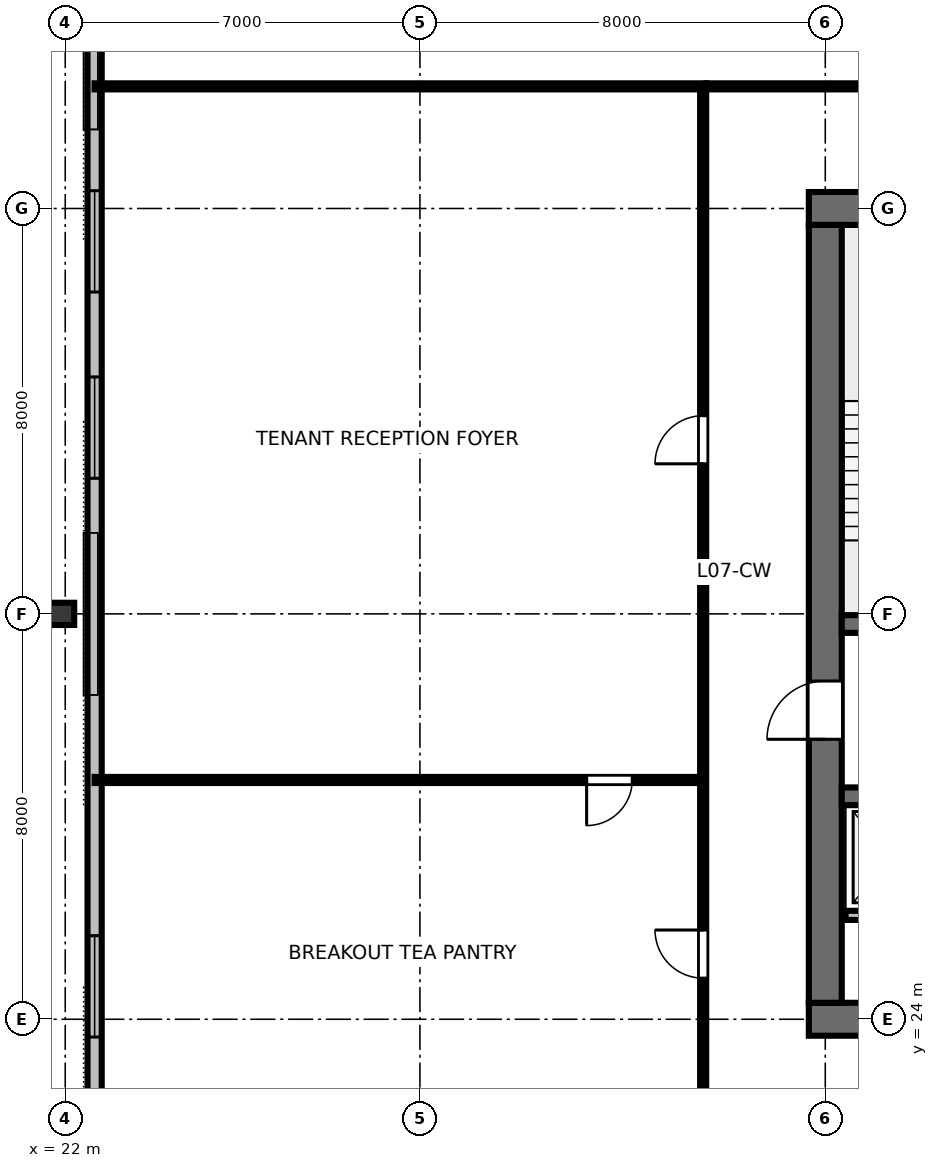
"""IFC4 building model, lengths in metres.
Left out: names, types, materials, properties, quantities, classifications, styles, units other than length and angle.
Written with IfcOpenShell. Run it as: python <this file> out.ifc"""

import sys

from ifc_helpers import new_model, si_unit, direction, frame, frame_2d, origin, origin_2d, place, context, subcontext, project, spatial, rectangle, i_section, extrude, element, fill, save


model = new_model("IFC4")
c1 = context("Model", 3, precision=1e-05, world=origin(), true_north=direction((0.0, 1.0)))
c2 = subcontext(c1, "Body", "Model", "MODEL_VIEW")
j1 = project(units=[si_unit("LENGTHUNIT", "METRE"), si_unit("PLANEANGLEUNIT", "RADIAN")], contexts=[c1])
p1 = place(None, origin())
s1 = spatial("IfcSite", under=j1, at=p1, CompositionType="ELEMENT")
p2 = place(p1, origin())
s2 = spatial("IfcBuilding", under=s1, at=p2, CompositionType="ELEMENT")
p3 = place(p2, frame((0.0, 0.0, 31.6)))
s3 = spatial("IfcBuildingStorey", under=s2, at=p3, CompositionType="ELEMENT", Elevation=31.6)
p4 = place(p3, frame((36.675, 24.0, 0.0), z_axis=(0.0, 0.0, 1.0), x_axis=(1.0, 0.0, 0.0)))
e1 = element("IfcWall", 1, at=p4, inside=s3, PredefinedType="SHEAR", context=c2, shape_type="SweptSolid", body=[
    extrude(rectangle(XDim=18.65, YDim=0.65, at=frame_2d((9.325, 0.0))), origin(), (0.0, 0.0, 1.0), 3.36),
])
p5 = place(p4, frame((5.725, 0.0, 0.0)))
e2 = element("IfcOpeningElement", 2, at=p5, cuts=e1, PredefinedType="OPENING", context=c2, shape_type="SweptSolid", body=[
    extrude(rectangle(XDim=1.6, YDim=2.15, at=frame_2d((0.8, 1.075))), frame((0.0, 0.335, 0.0), z_axis=(0.0, -1.0, 0.0), x_axis=(1.0, 0.0, 0.0)), (0.0, 0.0, 1.0), 0.67),
])
p6 = place(p4, frame((12.125, 0.0, 0.0)))
e3 = element("IfcOpeningElement", 3, at=p6, cuts=e1, PredefinedType="OPENING", context=c2, shape_type="SweptSolid", body=[
    extrude(rectangle(XDim=1.6, YDim=2.15, at=frame_2d((0.8, 1.075))), frame((0.0, 0.335, 0.0), z_axis=(0.0, -1.0, 0.0), x_axis=(1.0, 0.0, 0.0)), (0.0, 0.0, 1.0), 0.67),
])
p7 = place(p3, frame((36.675, 40.0, 0.0), z_axis=(0.0, 0.0, 1.0), x_axis=(1.0, 0.0, 0.0)))
e4 = element("IfcWall", 4, at=p7, inside=s3, PredefinedType="SHEAR", context=c2, shape_type="SweptSolid", body=[
    extrude(rectangle(XDim=18.65, YDim=0.65, at=frame_2d((9.325, 0.0))), origin(), (0.0, 0.0, 1.0), 3.36),
])
p8 = place(p7, frame((8.825, 0.0, 0.0)))
e5 = element("IfcOpeningElement", 5, at=p8, cuts=e4, PredefinedType="OPENING", context=c2, shape_type="SweptSolid", body=[
    extrude(rectangle(XDim=1.0, YDim=2.15, at=frame_2d((0.5, 1.075))), frame((0.0, 0.335, 0.0), z_axis=(0.0, -1.0, 0.0), x_axis=(1.0, 0.0, 0.0)), (0.0, 0.0, 1.0), 0.67),
])
p9 = place(p3, frame((37.0, 24.325, 0.0), z_axis=(0.0, 0.0, 1.0), x_axis=(0.0, 1.0, 0.0)))
e6 = element("IfcWall", 6, at=p9, inside=s3, PredefinedType="SHEAR", context=c2, shape_type="SweptSolid", body=[
    extrude(rectangle(XDim=15.35, YDim=0.65, at=frame_2d((7.675, 0.0))), origin(), (0.0, 0.0, 1.0), 3.36),
])
p10 = place(p9, frame((5.2, 0.0, 0.0)))
e7 = element("IfcOpeningElement", 7, at=p10, cuts=e6, PredefinedType="OPENING", context=c2, shape_type="SweptSolid", body=[
    extrude(rectangle(XDim=1.15, YDim=2.15, at=frame_2d((0.575, 1.075))), frame((0.0, 0.335, 0.0), z_axis=(0.0, -1.0, 0.0), x_axis=(1.0, 0.0, 0.0)), (0.0, 0.0, 1.0), 0.67),
])
p11 = place(p3, frame((37.325, 31.8, 0.0), z_axis=(0.0, 0.0, 1.0), x_axis=(1.0, 0.0, 0.0)))
e8 = element("IfcWall", 8, at=p11, inside=s3, PredefinedType="SHEAR", context=c2, shape_type="SweptSolid", body=[
    extrude(rectangle(XDim=17.35, YDim=0.35, at=frame_2d((8.675, 0.0))), origin(), (0.0, 0.0, 1.0), 3.36),
])
p12 = place(p11, frame((0.725, 0.0, 0.0)))
e9 = element("IfcOpeningElement", 9, at=p12, cuts=e8, PredefinedType="OPENING", context=c2, shape_type="SweptSolid", body=[
    extrude(rectangle(XDim=1.1, YDim=2.15, at=frame_2d((0.55, 1.075))), frame((0.0, 0.185, 0.0), z_axis=(0.0, -1.0, 0.0), x_axis=(1.0, 0.0, 0.0)), (0.0, 0.0, 1.0), 0.37),
])
p13 = place(p11, frame((14.625, 0.0, 0.0)))
e10 = element("IfcOpeningElement", 10, at=p13, cuts=e8, PredefinedType="OPENING", context=c2, shape_type="SweptSolid", body=[
    extrude(rectangle(XDim=1.1, YDim=2.15, at=frame_2d((0.55, 1.075))), frame((0.0, 0.185, 0.0), z_axis=(0.0, -1.0, 0.0), x_axis=(1.0, 0.0, 0.0)), (0.0, 0.0, 1.0), 0.37),
])
p14 = place(p3, frame((37.325, 28.4, 0.0), z_axis=(0.0, 0.0, 1.0), x_axis=(1.0, 0.0, 0.0)))
e11 = element("IfcWall", 11, at=p14, inside=s3, PredefinedType="SHEAR", context=c2, shape_type="SweptSolid", body=[
    extrude(rectangle(XDim=17.35, YDim=0.35, at=frame_2d((8.675, 0.0))), origin(), (0.0, 0.0, 1.0), 3.36),
])
p15 = place(p3, frame((21.92, 32.0, 0.0), z_axis=(0.0, 0.0, 1.0), x_axis=(0.0, 1.0, 0.0)))
e12 = element("IfcColumn", 12, at=p15, inside=s3, PredefinedType="COLUMN", context=c2, shape_type="SweptSolid", body=[
    extrude(i_section(OverallWidth=0.439, OverallDepth=0.514, WebThickness=0.06, FlangeThickness=0.097, FilletRadius=0.025, at=origin_2d()), origin(), (0.0, 0.0, 1.0), 3.148),
])
p16 = place(p3, frame((22.58, 49.64, 0.0), z_axis=(0.0, 0.0, 1.0), x_axis=(0.0, -1.0, 0.0)))
e13 = element("IfcWall", 13, at=p16, inside=s3, PredefinedType="STANDARD", context=c2, shape_type="SweptSolid", body=[
    extrude(rectangle(XDim=35.28, YDim=0.28, at=frame_2d((17.64, 0.0))), origin(), (0.0, 0.0, 1.0), 3.15),
])
p17 = place(p16, frame((1.938, 0.0, 0.8)))
e14 = element("IfcOpeningElement", 14, at=p17, cuts=e13, PredefinedType="OPENING", context=c2, shape_type="SweptSolid", body=[
    extrude(rectangle(XDim=2.0, YDim=1.95, at=frame_2d((1.0, 0.975))), frame((0.0, 0.15, 0.0), z_axis=(0.0, -1.0, 0.0), x_axis=(1.0, 0.0, 0.0)), (0.0, 0.0, 1.0), 0.3),
])
p18 = place(p16, frame((9.289, 0.0, 0.8)))
e15 = element("IfcOpeningElement", 15, at=p18, cuts=e13, PredefinedType="OPENING", context=c2, shape_type="SweptSolid", body=[
    extrude(rectangle(XDim=2.0, YDim=1.95, at=frame_2d((1.0, 0.975))), frame((0.0, 0.15, 0.0), z_axis=(0.0, -1.0, 0.0), x_axis=(1.0, 0.0, 0.0)), (0.0, 0.0, 1.0), 0.3),
])
p19 = place(p16, frame((12.964, 0.0, 0.8)))
e16 = element("IfcOpeningElement", 16, at=p19, cuts=e13, PredefinedType="OPENING", context=c2, shape_type="SweptSolid", body=[
    extrude(rectangle(XDim=2.0, YDim=1.95, at=frame_2d((1.0, 0.975))), frame((0.0, 0.15, 0.0), z_axis=(0.0, -1.0, 0.0), x_axis=(1.0, 0.0, 0.0)), (0.0, 0.0, 1.0), 0.3),
])
p20 = place(p16, frame((23.991, 0.0, 0.8)))
e17 = element("IfcOpeningElement", 17, at=p20, cuts=e13, PredefinedType="OPENING", context=c2, shape_type="SweptSolid", body=[
    extrude(rectangle(XDim=2.0, YDim=1.95, at=frame_2d((1.0, 0.975))), frame((0.0, 0.15, 0.0), z_axis=(0.0, -1.0, 0.0), x_axis=(1.0, 0.0, 0.0)), (0.0, 0.0, 1.0), 0.3),
])
p21 = place(p16, frame((31.342, 0.0, 0.8)))
e18 = element("IfcOpeningElement", 18, at=p21, cuts=e13, PredefinedType="OPENING", context=c2, shape_type="SweptSolid", body=[
    extrude(rectangle(XDim=2.0, YDim=1.95, at=frame_2d((1.0, 0.975))), frame((0.0, 0.15, 0.0), z_axis=(0.0, -1.0, 0.0), x_axis=(1.0, 0.0, 0.0)), (0.0, 0.0, 1.0), 0.3),
])
p22 = place(p3, frame((37.4, 26.05, 0.0), z_axis=(0.0, 0.0, 1.0), x_axis=(1.0, 0.0, 0.0)))
e19 = element("IfcWall", 19, at=p22, inside=s3, PredefinedType="PARTITIONING", context=c2, shape_type="SweptSolid", body=[
    extrude(rectangle(XDim=17.2, YDim=0.18, at=frame_2d((8.6, 0.0))), origin(), (0.0, 0.0, 1.0), 3.15),
])
p23 = place(p22, frame((1.1, 0.0, 0.0)))
e20 = element("IfcOpeningElement", 20, at=p23, cuts=e19, PredefinedType="OPENING", context=c2, shape_type="SweptSolid", body=[
    extrude(rectangle(XDim=1.05, YDim=2.15, at=frame_2d((0.525, 1.075))), frame((0.0, 0.1, 0.0), z_axis=(0.0, -1.0, 0.0), x_axis=(1.0, 0.0, 0.0)), (0.0, 0.0, 1.0), 0.2),
])
p24 = place(p22, frame((3.0, 0.0, 0.0)))
e21 = element("IfcOpeningElement", 21, at=p24, cuts=e19, PredefinedType="OPENING", context=c2, shape_type="SweptSolid", body=[
    extrude(rectangle(XDim=1.05, YDim=2.15, at=frame_2d((0.525, 1.075))), frame((0.0, 0.1, 0.0), z_axis=(0.0, -1.0, 0.0), x_axis=(1.0, 0.0, 0.0)), (0.0, 0.0, 1.0), 0.2),
])
p25 = place(p3, frame((34.65, 42.41, 0.0), z_axis=(0.0, 0.0, 1.0), x_axis=(1.0, 0.0, 0.0)))
e22 = element("IfcWall", 22, at=p25, inside=s3, PredefinedType="PARTITIONING", context=c2, shape_type="SweptSolid", body=[
    extrude(rectangle(XDim=22.7, YDim=0.12, at=frame_2d((11.35, 0.0))), origin(), (0.0, 0.0, 1.0), 2.43),
])
p26 = place(p25, frame((3.981, 0.0, 0.0)))
e23 = element("IfcOpeningElement", 23, at=p26, cuts=e22, PredefinedType="OPENING", context=c2, shape_type="SweptSolid", body=[
    extrude(rectangle(XDim=0.95, YDim=2.15, at=frame_2d((0.475, 1.075))), frame((0.0, 0.07, 0.0), z_axis=(0.0, -1.0, 0.0), x_axis=(1.0, 0.0, 0.0)), (0.0, 0.0, 1.0), 0.14),
])
p27 = place(p25, frame((10.508, 0.0, 0.0)))
e24 = element("IfcOpeningElement", 24, at=p27, cuts=e22, PredefinedType="OPENING", context=c2, shape_type="SweptSolid", body=[
    extrude(rectangle(XDim=0.95, YDim=2.15, at=frame_2d((0.475, 1.075))), frame((0.0, 0.07, 0.0), z_axis=(0.0, -1.0, 0.0), x_axis=(1.0, 0.0, 0.0)), (0.0, 0.0, 1.0), 0.14),
])
p28 = place(p25, frame((17.402, 0.0, 0.0)))
e25 = element("IfcOpeningElement", 25, at=p28, cuts=e22, PredefinedType="OPENING", context=c2, shape_type="SweptSolid", body=[
    extrude(rectangle(XDim=0.95, YDim=2.15, at=frame_2d((0.475, 1.075))), frame((0.0, 0.07, 0.0), z_axis=(0.0, -1.0, 0.0), x_axis=(1.0, 0.0, 0.0)), (0.0, 0.0, 1.0), 0.14),
])
p29 = place(p3, frame((34.59, 28.722, 0.0), z_axis=(0.0, 0.0, 1.0), x_axis=(-1.0, 0.0, 0.0)))
e26 = element("IfcWall", 26, at=p29, inside=s3, PredefinedType="PARTITIONING", context=c2, shape_type="SweptSolid", body=[
    extrude(rectangle(XDim=12.01, YDim=0.12, at=frame_2d((6.005, 0.0))), origin(), (0.0, 0.0, 1.0), 2.43),
])
p30 = place(p29, frame((1.4, 0.0, 0.0)))
e27 = element("IfcOpeningElement", 27, at=p30, cuts=e26, PredefinedType="OPENING", context=c2, shape_type="SweptSolid", body=[
    extrude(rectangle(XDim=0.9, YDim=2.15, at=frame_2d((0.45, 1.075))), frame((0.0, 0.07, 0.0), z_axis=(0.0, -1.0, 0.0), x_axis=(1.0, 0.0, 0.0)), (0.0, 0.0, 1.0), 0.14),
])
p31 = place(p3, frame((34.59, 21.65, 0.0), z_axis=(0.0, 0.0, 1.0), x_axis=(0.0, 1.0, 0.0)))
e28 = element("IfcWall", 28, at=p31, inside=s3, PredefinedType="PARTITIONING", context=c2, shape_type="SweptSolid", body=[
    extrude(rectangle(XDim=20.7, YDim=0.12, at=frame_2d((10.35, 0.0))), origin(), (0.0, 0.0, 1.0), 2.43),
])
p32 = place(p31, frame((3.161, 0.0, 0.0)))
e29 = element("IfcOpeningElement", 29, at=p32, cuts=e28, PredefinedType="OPENING", context=c2, shape_type="SweptSolid", body=[
    extrude(rectangle(XDim=0.95, YDim=2.15, at=frame_2d((0.475, 1.075))), frame((0.0, 0.07, 0.0), z_axis=(0.0, -1.0, 0.0), x_axis=(1.0, 0.0, 0.0)), (0.0, 0.0, 1.0), 0.14),
])
p33 = place(p31, frame((13.311, 0.0, 0.0)))
e30 = element("IfcOpeningElement", 30, at=p33, cuts=e28, PredefinedType="OPENING", context=c2, shape_type="SweptSolid", body=[
    extrude(rectangle(XDim=0.95, YDim=2.15, at=frame_2d((0.475, 1.075))), frame((0.0, 0.07, 0.0), z_axis=(0.0, -1.0, 0.0), x_axis=(1.0, 0.0, 0.0)), (0.0, 0.0, 1.0), 0.14),
])
p34 = place(p3, frame((34.65, 42.41, 0.0), z_axis=(0.0, 0.0, 1.0), x_axis=(-1.0, 0.0, 0.0)))
e31 = element("IfcWall", 31, at=p34, inside=s3, PredefinedType="PARTITIONING", context=c2, shape_type="SweptSolid", body=[
    extrude(rectangle(XDim=12.07, YDim=0.12, at=frame_2d((6.035, 0.0))), origin(), (0.0, 0.0, 1.0), 2.43),
])
p35 = place(p18, origin())
e32 = element("IfcWindow", 32, at=p35, inside=s3, PartitioningType="SINGLE_PANEL", PredefinedType="WINDOW", context=c2, shape_type="SweptSolid", body=[
    extrude(rectangle(XDim=2.0, YDim=1.95, at=frame_2d((1.0, 0.975))), frame((0.0, 0.03, 0.0), z_axis=(0.0, -1.0, 0.0), x_axis=(1.0, 0.0, 0.0)), (0.0, 0.0, 1.0), 0.06),
])
fill(e15, e32)
p36 = place(p19, origin())
e33 = element("IfcWindow", 33, at=p36, inside=s3, PartitioningType="SINGLE_PANEL", PredefinedType="WINDOW", context=c2, shape_type="SweptSolid", body=[
    extrude(rectangle(XDim=2.0, YDim=1.95, at=frame_2d((1.0, 0.975))), frame((0.0, 0.03, 0.0), z_axis=(0.0, -1.0, 0.0), x_axis=(1.0, 0.0, 0.0)), (0.0, 0.0, 1.0), 0.06),
])
fill(e16, e33)
p37 = place(p20, origin())
e34 = element("IfcWindow", 34, at=p37, inside=s3, PartitioningType="SINGLE_PANEL", PredefinedType="WINDOW", context=c2, shape_type="SweptSolid", body=[
    extrude(rectangle(XDim=2.0, YDim=1.95, at=frame_2d((1.0, 0.975))), frame((0.0, 0.03, 0.0), z_axis=(0.0, -1.0, 0.0), x_axis=(1.0, 0.0, 0.0)), (0.0, 0.0, 1.0), 0.06),
])
fill(e17, e34)
p38 = place(p10, origin())
e35 = element("IfcDoor", 35, at=p38, inside=s3, OperationType="SINGLE_SWING_LEFT", PredefinedType="DOOR", context=c2, shape_type="SweptSolid", body=[
    extrude(rectangle(XDim=1.15, YDim=2.15, at=frame_2d((0.575, 1.075))), frame((0.0, 0.025, 0.0), z_axis=(0.0, -1.0, 0.0), x_axis=(1.0, 0.0, 0.0)), (0.0, 0.0, 1.0), 0.05),
])
fill(e7, e35)
p39 = place(p30, origin())
e36 = element("IfcDoor", 36, at=p39, inside=s3, OperationType="SINGLE_SWING_RIGHT", PredefinedType="DOOR", context=c2, shape_type="SweptSolid", body=[
    extrude(rectangle(XDim=0.9, YDim=2.15, at=frame_2d((0.45, 1.075))), frame((0.0, 0.025, 0.0), z_axis=(0.0, -1.0, 0.0), x_axis=(1.0, 0.0, 0.0)), (0.0, 0.0, 1.0), 0.05),
])
fill(e27, e36)
p40 = place(p32, origin())
e37 = element("IfcDoor", 37, at=p40, inside=s3, OperationType="SINGLE_SWING_RIGHT", PredefinedType="DOOR", context=c2, shape_type="SweptSolid", body=[
    extrude(rectangle(XDim=0.95, YDim=2.15, at=frame_2d((0.475, 1.075))), frame((0.0, 0.025, 0.0), z_axis=(0.0, -1.0, 0.0), x_axis=(1.0, 0.0, 0.0)), (0.0, 0.0, 1.0), 0.05),
])
fill(e29, e37)
p41 = place(p33, origin())
e38 = element("IfcDoor", 38, at=p41, inside=s3, OperationType="SINGLE_SWING_LEFT", PredefinedType="DOOR", context=c2, shape_type="SweptSolid", body=[
    extrude(rectangle(XDim=0.95, YDim=2.15, at=frame_2d((0.475, 1.075))), frame((0.0, 0.025, 0.0), z_axis=(0.0, -1.0, 0.0), x_axis=(1.0, 0.0, 0.0)), (0.0, 0.0, 1.0), 0.05),
])
fill(e30, e38)
save(model, sys.argv[1])
